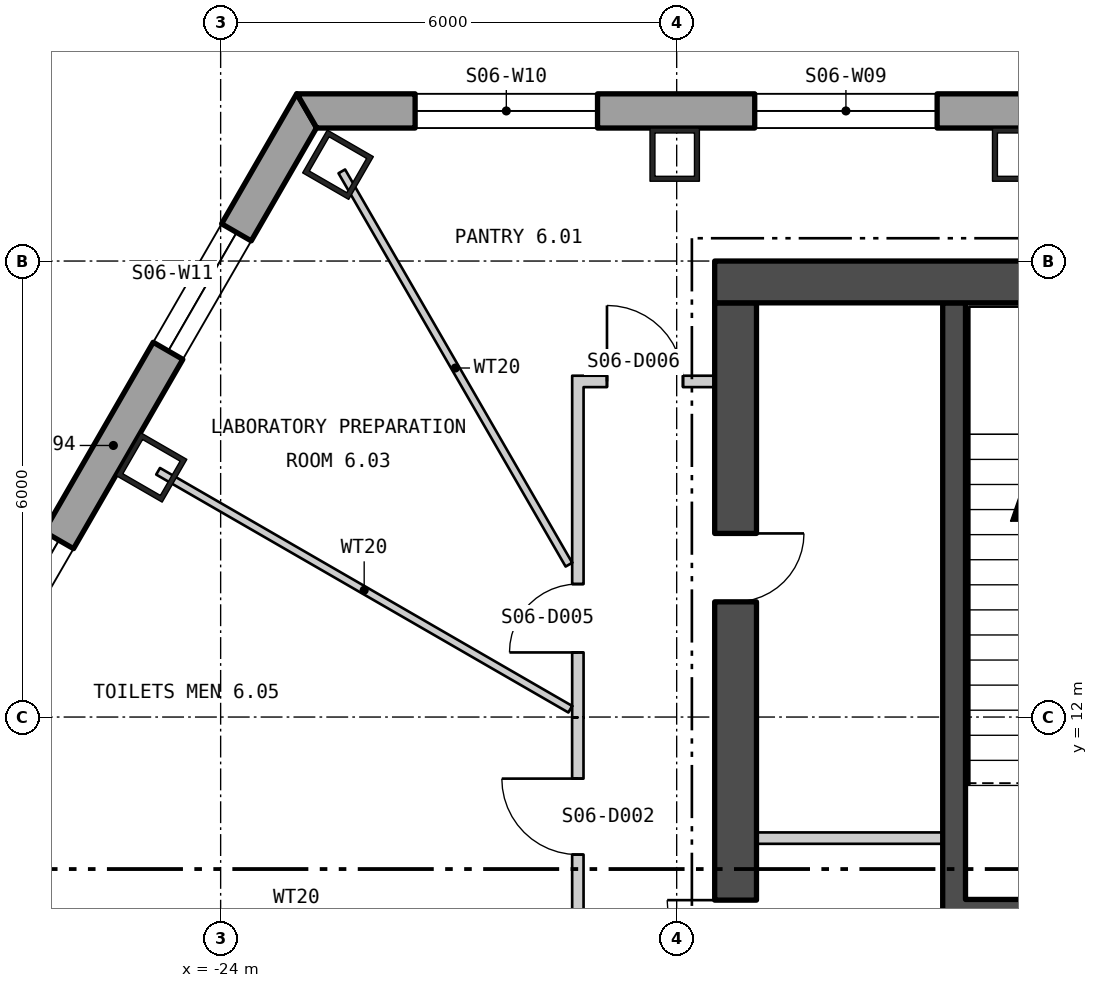
"""IFC4 building model, lengths in metres.
Left out: names, types, materials, properties, quantities, classifications, styles, units other than length and angle.
Written with IfcOpenShell. Run it as: python <this file> out.ifc"""

import sys

from ifc_helpers import new_model, si_unit, direction, frame, frame_2d, origin, origin_2d, place, context, subcontext, project, spatial, polyline, rectangle, hollow_rectangle, outline, extrude, element, fill, save


model = new_model("IFC4")
c1 = context("Model", 3, precision=1e-05, world=origin(), true_north=direction((0.0, 1.0)))
c2 = subcontext(c1, "Body", "Model", "MODEL_VIEW")
j1 = project(units=[si_unit("LENGTHUNIT", "METRE"), si_unit("PLANEANGLEUNIT", "RADIAN")], contexts=[c1])
p1 = place(None, origin())
s1 = spatial("IfcSite", under=j1, at=p1, CompositionType="ELEMENT")
p2 = place(p1, origin())
s2 = spatial("IfcBuilding", under=s1, at=p2, CompositionType="ELEMENT")
p3 = place(p2, frame((0.0, 0.0, 84.3)))
s3 = spatial("IfcBuildingStorey", under=s2, at=p3, CompositionType="ELEMENT", Elevation=84.3)
for number, where, z_axis, x_axis in (
    (1, (-13.52, 19.4, 0.0), (0.0, 0.0, 1.0), (-1.0, 0.0, 0.0)),
    (2, (-18.026, 19.4, 0.0), (0.0, 0.0, 1.0), (-1.0, 0.0, 0.0)),
    (3, (-22.456, 19.267, 0.0), (0.0, 0.0, 1.0), (-0.5, -0.866, 0.0)),
):
    element("IfcColumn", number, at=place(p3, frame(where, z_axis=z_axis, x_axis=x_axis)), inside=s3, PredefinedType="COLUMN", context=c2, shape_type="SweptSolid", body=[
        extrude(hollow_rectangle(XDim=0.65, YDim=0.7, WallThickness=0.065, at=origin_2d()), origin(), (0.0, 0.0, 1.0), 4.5),
    ])
p4 = place(p3, frame((-24.91, 15.284, -0.8), z_axis=(0.0, 0.0, 1.0), x_axis=(-0.5, -0.866025403784, 0.0)))
e4 = element("IfcColumn", 4, at=p4, inside=s3, PredefinedType="COLUMN", context=c2, shape_type="SweptSolid", body=[
    extrude(hollow_rectangle(XDim=0.65, YDim=0.7, WallThickness=0.065, at=origin_2d()), origin(), (0.0, 0.0, 1.0), 5.3),
])
p5 = place(p3, frame((22.865, 19.975, -0.4), z_axis=(0.0, 0.0, 1.0), x_axis=(-1.0, 0.0, 0.0)))
e5 = element("IfcWall", 5, at=p5, inside=s3, PredefinedType="SOLIDWALL", context=c2, shape_type="SweptSolid", body=[
    extrude(outline(polyline([(-0.13, -0.225), (45.86, -0.225), (45.6, 0.225), (0.13, 0.225), (-0.13, -0.225)])), origin(), (0.0, 0.0, 1.0), 4.5),
])
p6 = place(p5, frame((1.424, 0.0, 1.3)))
e6 = element("IfcOpeningElement", 6, at=p6, cuts=e5, PredefinedType="OPENING", context=c2, shape_type="SweptSolid", body=[
    extrude(rectangle(XDim=2.4, YDim=2.6, at=frame_2d((1.2, 1.3))), frame((0.0, 0.235, 0.0), z_axis=(0.0, -1.0, 0.0), x_axis=(1.0, 0.0, 0.0)), (0.0, 0.0, 1.0), 0.47),
])
p7 = place(p5, frame((5.892, 0.0, 1.3)))
e7 = element("IfcOpeningElement", 7, at=p7, cuts=e5, PredefinedType="OPENING", context=c2, shape_type="SweptSolid", body=[
    extrude(rectangle(XDim=2.4, YDim=2.6, at=frame_2d((1.2, 1.3))), frame((0.0, 0.235, 0.0), z_axis=(0.0, -1.0, 0.0), x_axis=(1.0, 0.0, 0.0)), (0.0, 0.0, 1.0), 0.47),
])
p8 = place(p5, frame((10.399, 0.0, 1.3)))
e8 = element("IfcOpeningElement", 8, at=p8, cuts=e5, PredefinedType="OPENING", context=c2, shape_type="SweptSolid", body=[
    extrude(rectangle(XDim=2.4, YDim=2.6, at=frame_2d((1.2, 1.3))), frame((0.0, 0.235, 0.0), z_axis=(0.0, -1.0, 0.0), x_axis=(1.0, 0.0, 0.0)), (0.0, 0.0, 1.0), 0.47),
])
p9 = place(p5, frame((14.905, 0.0, 1.3)))
e9 = element("IfcOpeningElement", 9, at=p9, cuts=e5, PredefinedType="OPENING", context=c2, shape_type="SweptSolid", body=[
    extrude(rectangle(XDim=2.4, YDim=2.6, at=frame_2d((1.2, 1.3))), frame((0.0, 0.235, 0.0), z_axis=(0.0, -1.0, 0.0), x_axis=(1.0, 0.0, 0.0)), (0.0, 0.0, 1.0), 0.47),
])
p10 = place(p5, frame((19.412, 0.0, 1.3)))
e10 = element("IfcOpeningElement", 10, at=p10, cuts=e5, PredefinedType="OPENING", context=c2, shape_type="SweptSolid", body=[
    extrude(rectangle(XDim=2.4, YDim=2.6, at=frame_2d((1.2, 1.3))), frame((0.0, 0.235, 0.0), z_axis=(0.0, -1.0, 0.0), x_axis=(1.0, 0.0, 0.0)), (0.0, 0.0, 1.0), 0.47),
])
p11 = place(p5, frame((23.918, 0.0, 1.3)))
e11 = element("IfcOpeningElement", 11, at=p11, cuts=e5, PredefinedType="OPENING", context=c2, shape_type="SweptSolid", body=[
    extrude(rectangle(XDim=2.4, YDim=2.6, at=frame_2d((1.2, 1.3))), frame((0.0, 0.235, 0.0), z_axis=(0.0, -1.0, 0.0), x_axis=(1.0, 0.0, 0.0)), (0.0, 0.0, 1.0), 0.47),
])
p12 = place(p5, frame((28.425, 0.0, 1.3)))
e12 = element("IfcOpeningElement", 12, at=p12, cuts=e5, PredefinedType="OPENING", context=c2, shape_type="SweptSolid", body=[
    extrude(rectangle(XDim=2.4, YDim=2.6, at=frame_2d((1.2, 1.3))), frame((0.0, 0.235, 0.0), z_axis=(0.0, -1.0, 0.0), x_axis=(1.0, 0.0, 0.0)), (0.0, 0.0, 1.0), 0.47),
])
p13 = place(p5, frame((32.932, 0.0, 1.3)))
e13 = element("IfcOpeningElement", 13, at=p13, cuts=e5, PredefinedType="OPENING", context=c2, shape_type="SweptSolid", body=[
    extrude(rectangle(XDim=2.4, YDim=2.6, at=frame_2d((1.2, 1.3))), frame((0.0, 0.235, 0.0), z_axis=(0.0, -1.0, 0.0), x_axis=(1.0, 0.0, 0.0)), (0.0, 0.0, 1.0), 0.47),
])
p14 = place(p5, frame((37.438, 0.0, 1.3)))
e14 = element("IfcOpeningElement", 14, at=p14, cuts=e5, PredefinedType="OPENING", context=c2, shape_type="SweptSolid", body=[
    extrude(rectangle(XDim=2.4, YDim=2.6, at=frame_2d((1.2, 1.3))), frame((0.0, 0.235, 0.0), z_axis=(0.0, -1.0, 0.0), x_axis=(1.0, 0.0, 0.0)), (0.0, 0.0, 1.0), 0.47),
])
p15 = place(p5, frame((41.907, 0.0, 1.3)))
e15 = element("IfcOpeningElement", 15, at=p15, cuts=e5, PredefinedType="OPENING", context=c2, shape_type="SweptSolid", body=[
    extrude(rectangle(XDim=2.4, YDim=2.6, at=frame_2d((1.2, 1.3))), frame((0.0, 0.235, 0.0), z_axis=(0.0, -1.0, 0.0), x_axis=(1.0, 0.0, 0.0)), (0.0, 0.0, 1.0), 0.47),
])
p16 = place(p3, frame((-22.869, 19.977, -0.4), z_axis=(0.0, 0.0, 1.0), x_axis=(-0.499997937663, -0.866026594472, 0.0)))
e16 = element("IfcWall", 16, at=p16, inside=s3, PredefinedType="SOLIDWALL", context=c2, shape_type="SweptSolid", body=[
    extrude(outline(polyline([(-0.13, -0.225), (10.3, -0.225), (10.04, 0.225), (0.13, 0.225), (-0.13, -0.225)])), origin(), (0.0, 0.0, 1.0), 4.5),
])
p17 = place(p16, frame((1.847, 0.0, 1.3)))
e17 = element("IfcOpeningElement", 17, at=p17, cuts=e16, PredefinedType="OPENING", context=c2, shape_type="SweptSolid", body=[
    extrude(rectangle(XDim=1.8, YDim=2.6, at=frame_2d((0.9, 1.3))), frame((0.0, 0.235, 0.0), z_axis=(0.0, -1.0, 0.0), x_axis=(1.0, 0.0, 0.0)), (0.0, 0.0, 1.0), 0.47),
])
p18 = place(p16, frame((6.523, 0.0, 1.3)))
e18 = element("IfcOpeningElement", 18, at=p18, cuts=e16, PredefinedType="OPENING", context=c2, shape_type="SweptSolid", body=[
    extrude(rectangle(XDim=1.8, YDim=2.6, at=frame_2d((0.9, 1.3))), frame((0.0, 0.235, 0.0), z_axis=(0.0, -1.0, 0.0), x_axis=(1.0, 0.0, 0.0)), (0.0, 0.0, 1.0), 0.47),
])
p19 = place(p3, frame((-27.95, 11.167, -0.18), z_axis=(0.0, 0.0, 1.0), x_axis=(0.499999194392, -0.866025868902, 0.0)))
e19 = element("IfcWall", 19, at=p19, inside=s3, PredefinedType="SOLIDWALL", context=c2, shape_type="SweptSolid", body=[
    extrude(outline(polyline([(-0.13, -0.225), (45.86, -0.225), (45.6, 0.225), (0.13, 0.225), (-0.13, -0.225)])), origin(), (0.0, 0.0, 1.0), 4.28),
])
p20 = place(p19, frame((5.892, 0.0, 1.08)))
e20 = element("IfcOpeningElement", 20, at=p20, cuts=e19, PredefinedType="OPENING", context=c2, shape_type="SweptSolid", body=[
    extrude(rectangle(XDim=2.4, YDim=2.6, at=frame_2d((1.2, 1.3))), frame((0.0, 0.235, 0.0), z_axis=(0.0, -1.0, 0.0), x_axis=(1.0, 0.0, 0.0)), (0.0, 0.0, 1.0), 0.47),
])
p21 = place(p19, frame((10.399, 0.0, 1.08)))
e21 = element("IfcOpeningElement", 21, at=p21, cuts=e19, PredefinedType="OPENING", context=c2, shape_type="SweptSolid", body=[
    extrude(rectangle(XDim=2.4, YDim=2.6, at=frame_2d((1.2, 1.3))), frame((0.0, 0.235, 0.0), z_axis=(0.0, -1.0, 0.0), x_axis=(1.0, 0.0, 0.0)), (0.0, 0.0, 1.0), 0.47),
])
p22 = place(p19, frame((14.905, 0.0, 1.08)))
e22 = element("IfcOpeningElement", 22, at=p22, cuts=e19, PredefinedType="OPENING", context=c2, shape_type="SweptSolid", body=[
    extrude(rectangle(XDim=2.4, YDim=2.6, at=frame_2d((1.2, 1.3))), frame((0.0, 0.235, 0.0), z_axis=(0.0, -1.0, 0.0), x_axis=(1.0, 0.0, 0.0)), (0.0, 0.0, 1.0), 0.47),
])
p23 = place(p19, frame((19.412, 0.0, 1.08)))
e23 = element("IfcOpeningElement", 23, at=p23, cuts=e19, PredefinedType="OPENING", context=c2, shape_type="SweptSolid", body=[
    extrude(rectangle(XDim=2.4, YDim=2.6, at=frame_2d((1.2, 1.3))), frame((0.0, 0.235, 0.0), z_axis=(0.0, -1.0, 0.0), x_axis=(1.0, 0.0, 0.0)), (0.0, 0.0, 1.0), 0.47),
])
p24 = place(p19, frame((23.918, 0.0, 1.08)))
e24 = element("IfcOpeningElement", 24, at=p24, cuts=e19, PredefinedType="OPENING", context=c2, shape_type="SweptSolid", body=[
    extrude(rectangle(XDim=2.4, YDim=2.6, at=frame_2d((1.2, 1.3))), frame((0.0, 0.235, 0.0), z_axis=(0.0, -1.0, 0.0), x_axis=(1.0, 0.0, 0.0)), (0.0, 0.0, 1.0), 0.47),
])
p25 = place(p19, frame((28.425, 0.0, 1.08)))
e25 = element("IfcOpeningElement", 25, at=p25, cuts=e19, PredefinedType="OPENING", context=c2, shape_type="SweptSolid", body=[
    extrude(rectangle(XDim=2.4, YDim=2.6, at=frame_2d((1.2, 1.3))), frame((0.0, 0.235, 0.0), z_axis=(0.0, -1.0, 0.0), x_axis=(1.0, 0.0, 0.0)), (0.0, 0.0, 1.0), 0.47),
])
p26 = place(p19, frame((32.932, 0.0, 1.08)))
e26 = element("IfcOpeningElement", 26, at=p26, cuts=e19, PredefinedType="OPENING", context=c2, shape_type="SweptSolid", body=[
    extrude(rectangle(XDim=2.4, YDim=2.6, at=frame_2d((1.2, 1.3))), frame((0.0, 0.235, 0.0), z_axis=(0.0, -1.0, 0.0), x_axis=(1.0, 0.0, 0.0)), (0.0, 0.0, 1.0), 0.47),
])
p27 = place(p19, frame((37.438, 0.0, 1.08)))
e27 = element("IfcOpeningElement", 27, at=p27, cuts=e19, PredefinedType="OPENING", context=c2, shape_type="SweptSolid", body=[
    extrude(rectangle(XDim=2.4, YDim=2.6, at=frame_2d((1.2, 1.3))), frame((0.0, 0.235, 0.0), z_axis=(0.0, -1.0, 0.0), x_axis=(1.0, 0.0, 0.0)), (0.0, 0.0, 1.0), 0.47),
])
p28 = place(p19, frame((41.907, 0.0, 1.08)))
e28 = element("IfcOpeningElement", 28, at=p28, cuts=e19, PredefinedType="OPENING", context=c2, shape_type="SweptSolid", body=[
    extrude(rectangle(XDim=2.4, YDim=2.6, at=frame_2d((1.2, 1.3))), frame((0.0, 0.235, 0.0), z_axis=(0.0, -1.0, 0.0), x_axis=(1.0, 0.0, 0.0)), (0.0, 0.0, 1.0), 0.47),
])
p29 = place(p3, frame((-17.5, 17.725, 0.0), z_axis=(0.0, 0.0, 1.0), x_axis=(1.0, 0.0, 0.0)))
e29 = element("IfcWall", 29, at=p29, inside=s3, PredefinedType="SHEAR", context=c2, shape_type="SweptSolid", body=[
    extrude(rectangle(XDim=35.0, YDim=0.55, at=frame_2d((17.5, 0.0))), origin(), (0.0, 0.0, 1.0), 4.3),
])
p30 = place(p3, frame((-17.225, 0.55, 0.0), z_axis=(0.0, 0.0, 1.0), x_axis=(0.0, 1.0, 0.0)))
e30 = element("IfcWall", 30, at=p30, inside=s3, PredefinedType="SHEAR", context=c2, shape_type="SweptSolid", body=[
    extrude(rectangle(XDim=16.9, YDim=0.55, at=frame_2d((8.45, 0.0))), origin(), (0.0, 0.0, 1.0), 4.3),
])
p31 = place(p30, frame((5.75, 0.0, 0.0)))
e31 = element("IfcOpeningElement", 31, at=p31, cuts=e30, PredefinedType="OPENING", context=c2, shape_type="SweptSolid", body=[
    extrude(rectangle(XDim=1.5, YDim=2.1, at=frame_2d((0.75, 1.05))), frame((0.0, 0.285, 0.0), z_axis=(0.0, -1.0, 0.0), x_axis=(1.0, 0.0, 0.0)), (0.0, 0.0, 1.0), 0.57),
])
p32 = place(p30, frame((0.4, 0.0, 0.0)))
e32 = element("IfcOpeningElement", 32, at=p32, cuts=e30, PredefinedType="OPENING", context=c2, shape_type="SweptSolid", body=[
    extrude(rectangle(XDim=1.0, YDim=2.1, at=frame_2d((0.5, 1.05))), frame((0.0, 0.285, 0.0), z_axis=(0.0, -1.0, 0.0), x_axis=(1.0, 0.0, 0.0)), (0.0, 0.0, 1.0), 0.57),
])
p33 = place(p30, frame((3.21, 0.0, 0.0)))
e33 = element("IfcOpeningElement", 33, at=p33, cuts=e30, PredefinedType="OPENING", context=c2, shape_type="SweptSolid", body=[
    extrude(rectangle(XDim=0.9, YDim=2.1, at=frame_2d((0.45, 1.05))), frame((0.0, 0.285, 0.0), z_axis=(0.0, -1.0, 0.0), x_axis=(1.0, 0.0, 0.0)), (0.0, 0.0, 1.0), 0.57),
])
p34 = place(p30, frame((8.141, 0.0, 0.0)))
e34 = element("IfcOpeningElement", 34, at=p34, cuts=e30, PredefinedType="OPENING", context=c2, shape_type="SweptSolid", body=[
    extrude(rectangle(XDim=0.9, YDim=2.1, at=frame_2d((0.45, 1.05))), frame((0.0, 0.285, 0.0), z_axis=(0.0, -1.0, 0.0), x_axis=(1.0, 0.0, 0.0)), (0.0, 0.0, 1.0), 0.57),
])
p35 = place(p30, frame((12.966, 0.0, 0.0)))
e35 = element("IfcOpeningElement", 35, at=p35, cuts=e30, PredefinedType="OPENING", context=c2, shape_type="SweptSolid", body=[
    extrude(rectangle(XDim=0.9, YDim=2.1, at=frame_2d((0.45, 1.05))), frame((0.0, 0.285, 0.0), z_axis=(0.0, -1.0, 0.0), x_axis=(1.0, 0.0, 0.0)), (0.0, 0.0, 1.0), 0.57),
])
p36 = place(p3, frame((-14.35, 0.55, 0.0), z_axis=(0.0, 0.0, 1.0), x_axis=(0.0, 1.0, 0.0)))
e36 = element("IfcWall", 36, at=p36, inside=s3, PredefinedType="SHEAR", context=c2, shape_type="SweptSolid", body=[
    extrude(rectangle(XDim=16.9, YDim=0.3, at=frame_2d((8.45, 0.0))), origin(), (0.0, 0.0, 1.0), 4.3),
])
p37 = place(p36, frame((5.75, 0.0, 0.0)))
e37 = element("IfcOpeningElement", 37, at=p37, cuts=e36, PredefinedType="OPENING", context=c2, shape_type="SweptSolid", body=[
    extrude(rectangle(XDim=1.5, YDim=2.1, at=frame_2d((0.75, 1.05))), frame((0.0, 0.16, 0.0), z_axis=(0.0, -1.0, 0.0), x_axis=(1.0, 0.0, 0.0)), (0.0, 0.0, 1.0), 0.32),
])
p38 = place(p3, frame((-14.2, 9.45, 0.0), z_axis=(0.0, 0.0, 1.0), x_axis=(1.0, 0.0, 0.0)))
e38 = element("IfcWall", 38, at=p38, inside=s3, PredefinedType="SHEAR", context=c2, shape_type="SweptSolid", body=[
    extrude(rectangle(XDim=3.2, YDim=0.3, at=frame_2d((1.6, 0.0))), origin(), (0.0, 0.0, 1.0), 4.3),
])
p39 = place(p38, frame((1.0, 0.0, 0.0)))
e39 = element("IfcOpeningElement", 39, at=p39, cuts=e38, PredefinedType="OPENING", context=c2, shape_type="SweptSolid", body=[
    extrude(rectangle(XDim=1.2, YDim=2.1, at=frame_2d((0.6, 1.05))), frame((0.0, 0.16, 0.0), z_axis=(0.0, -1.0, 0.0), x_axis=(1.0, 0.0, 0.0)), (0.0, 0.0, 1.0), 0.32),
])
p40 = place(p3, frame((-16.95, 10.407, 0.0), z_axis=(0.0, 0.0, 1.0), x_axis=(1.0, 0.0, 0.0)))
e40 = element("IfcWall", 40, at=p40, inside=s3, PredefinedType="PARTITIONING", context=c2, shape_type="SweptSolid", body=[
    extrude(rectangle(XDim=2.45, YDim=0.15, at=frame_2d((1.225, 0.0))), origin(), (0.0, 0.0, 1.0), 4.3),
])
p41 = place(p3, frame((-24.823, 15.234, 0.0), z_axis=(0.0, 0.0, 1.0), x_axis=(0.866023364538, -0.500003532061, 0.0)))
e41 = element("IfcWall", 41, at=p41, inside=s3, PredefinedType="PARTITIONING", context=c2, shape_type="SweptSolid", body=[
    extrude(rectangle(XDim=6.262, YDim=0.1, at=frame_2d((3.131, 0.0))), origin(), (0.0, 0.0, 1.0), 4.3),
])
p42 = place(p3, frame((-22.406, 19.18, 0.0), z_axis=(0.0, 0.0, 1.0), x_axis=(0.500026652407, -0.866010015463, 0.0)))
e42 = element("IfcWall", 42, at=p42, inside=s3, PredefinedType="PARTITIONING", context=c2, shape_type="SweptSolid", body=[
    extrude(rectangle(XDim=5.976, YDim=0.1, at=frame_2d((2.988, 0.0))), origin(), (0.0, 0.0, 1.0), 4.3),
])
p43 = place(p3, frame((-19.301, 11.995, 0.0), z_axis=(0.0, 0.0, 1.0), x_axis=(0.000383141734, -0.999999926601, 0.0)))
e43 = element("IfcWall", 43, at=p43, inside=s3, PredefinedType="PARTITIONING", context=c2, shape_type="SweptSolid", body=[
    extrude(rectangle(XDim=2.61, YDim=0.15, at=frame_2d((1.305, 0.0))), origin(), (0.0, 0.0, 1.0), 4.3),
])
p44 = place(p43, frame((0.805, 0.0, 0.0)))
e44 = element("IfcOpeningElement", 44, at=p44, cuts=e43, PredefinedType="OPENING", context=c2, shape_type="SweptSolid", body=[
    extrude(rectangle(XDim=1.0, YDim=2.1, at=frame_2d((0.5, 1.05))), frame((0.0, 0.085, 0.0), z_axis=(0.0, -1.0, 0.0), x_axis=(1.0, 0.0, 0.0)), (0.0, 0.0, 1.0), 0.17),
])
p45 = place(p3, frame((-19.3, 11.995, 0.0), z_axis=(0.0, 0.0, 1.0), x_axis=(0.0, 1.0, 0.0)))
e45 = element("IfcWall", 45, at=p45, inside=s3, PredefinedType="PARTITIONING", context=c2, shape_type="SweptSolid", body=[
    extrude(rectangle(XDim=4.496, YDim=0.15, at=frame_2d((2.248, 0.0))), origin(), (0.0, 0.0, 1.0), 4.3),
])
p46 = place(p45, frame((0.855, 0.0, 0.0)))
e46 = element("IfcOpeningElement", 46, at=p46, cuts=e45, PredefinedType="OPENING", context=c2, shape_type="SweptSolid", body=[
    extrude(rectangle(XDim=0.9, YDim=2.1, at=frame_2d((0.45, 1.05))), frame((0.0, 0.085, 0.0), z_axis=(0.0, -1.0, 0.0), x_axis=(1.0, 0.0, 0.0)), (0.0, 0.0, 1.0), 0.17),
])
p47 = place(p3, frame((-19.225, 16.416, 0.0), z_axis=(0.0, 0.0, 1.0), x_axis=(1.0, 0.0, 0.0)))
e47 = element("IfcWall", 47, at=p47, inside=s3, PredefinedType="PARTITIONING", context=c2, shape_type="SweptSolid", body=[
    extrude(rectangle(XDim=1.725, YDim=0.15, at=frame_2d((0.863, 0.0))), origin(), (0.0, 0.0, 1.0), 4.3),
])
p48 = place(p47, frame((0.308, 0.0, 0.0)))
e48 = element("IfcOpeningElement", 48, at=p48, cuts=e47, PredefinedType="OPENING", context=c2, shape_type="SweptSolid", body=[
    extrude(rectangle(XDim=1.0, YDim=2.1, at=frame_2d((0.5, 1.05))), frame((0.0, 0.085, 0.0), z_axis=(0.0, -1.0, 0.0), x_axis=(1.0, 0.0, 0.0)), (0.0, 0.0, 1.0), 0.17),
])
p49 = place(p14, origin())
e49 = element("IfcWindow", 49, at=p49, inside=s3, PartitioningType="SINGLE_PANEL", PredefinedType="WINDOW", context=c2, shape_type="SweptSolid", body=[
    extrude(rectangle(XDim=2.4, YDim=2.6, at=frame_2d((1.2, 1.3))), frame((0.0, 0.105, 0.0), z_axis=(0.0, -1.0, 0.0), x_axis=(1.0, 0.0, 0.0)), (0.0, 0.0, 1.0), 0.06),
])
fill(e14, e49)
p50 = place(p15, origin())
e50 = element("IfcWindow", 50, at=p50, inside=s3, PartitioningType="SINGLE_PANEL", PredefinedType="WINDOW", context=c2, shape_type="SweptSolid", body=[
    extrude(rectangle(XDim=2.4, YDim=2.6, at=frame_2d((1.2, 1.3))), frame((0.0, 0.105, 0.0), z_axis=(0.0, -1.0, 0.0), x_axis=(1.0, 0.0, 0.0)), (0.0, 0.0, 1.0), 0.06),
])
fill(e15, e50)
p51 = place(p17, origin())
e51 = element("IfcWindow", 51, at=p51, inside=s3, PartitioningType="SINGLE_PANEL", PredefinedType="WINDOW", context=c2, shape_type="SweptSolid", body=[
    extrude(rectangle(XDim=1.8, YDim=2.6, at=frame_2d((0.9, 1.3))), frame((0.0, 0.105, 0.0), z_axis=(0.0, -1.0, 0.0), x_axis=(1.0, 0.0, 0.0)), (0.0, 0.0, 1.0), 0.06),
])
fill(e17, e51)
p52 = place(p18, origin())
e52 = element("IfcWindow", 52, at=p52, inside=s3, PartitioningType="SINGLE_PANEL", PredefinedType="WINDOW", context=c2, shape_type="SweptSolid", body=[
    extrude(rectangle(XDim=1.8, YDim=2.6, at=frame_2d((0.9, 1.3))), frame((0.0, 0.105, 0.0), z_axis=(0.0, -1.0, 0.0), x_axis=(1.0, 0.0, 0.0)), (0.0, 0.0, 1.0), 0.06),
])
fill(e18, e52)
p53 = place(p34, origin())
e53 = element("IfcDoor", 53, at=p53, inside=s3, OperationType="SINGLE_SWING_LEFT", PredefinedType="DOOR", context=c2, shape_type="SweptSolid", body=[
    extrude(rectangle(XDim=0.9, YDim=2.1, at=frame_2d((0.45, 1.05))), frame((0.0, 0.025, 0.0), z_axis=(0.0, -1.0, 0.0), x_axis=(1.0, 0.0, 0.0)), (0.0, 0.0, 1.0), 0.05),
])
fill(e34, e53)
p54 = place(p35, origin())
e54 = element("IfcDoor", 54, at=p54, inside=s3, OperationType="SINGLE_SWING_RIGHT", PredefinedType="DOOR", context=c2, shape_type="SweptSolid", body=[
    extrude(rectangle(XDim=0.9, YDim=2.1, at=frame_2d((0.45, 1.05))), frame((0.0, 0.025, 0.0), z_axis=(0.0, -1.0, 0.0), x_axis=(1.0, 0.0, 0.0)), (0.0, 0.0, 1.0), 0.05),
])
fill(e35, e54)
p55 = place(p44, origin())
e55 = element("IfcDoor", 55, at=p55, inside=s3, OperationType="SINGLE_SWING_LEFT", PredefinedType="DOOR", context=c2, shape_type="SweptSolid", body=[
    extrude(rectangle(XDim=1.0, YDim=2.1, at=frame_2d((0.5, 1.05))), frame((0.0, 0.025, 0.0), z_axis=(0.0, -1.0, 0.0), x_axis=(1.0, 0.0, 0.0)), (0.0, 0.0, 1.0), 0.05),
])
fill(e44, e55)
p56 = place(p46, origin())
e56 = element("IfcDoor", 56, at=p56, inside=s3, OperationType="SINGLE_SWING_RIGHT", PredefinedType="DOOR", context=c2, shape_type="SweptSolid", body=[
    extrude(rectangle(XDim=0.9, YDim=2.1, at=frame_2d((0.45, 1.05))), frame((0.0, 0.025, 0.0), z_axis=(0.0, -1.0, 0.0), x_axis=(1.0, 0.0, 0.0)), (0.0, 0.0, 1.0), 0.05),
])
fill(e46, e56)
p57 = place(p48, origin())
e57 = element("IfcDoor", 57, at=p57, inside=s3, OperationType="SINGLE_SWING_RIGHT", PredefinedType="DOOR", context=c2, shape_type="SweptSolid", body=[
    extrude(rectangle(XDim=1.0, YDim=2.1, at=frame_2d((0.5, 1.05))), frame((0.0, 0.025, 0.0), z_axis=(0.0, -1.0, 0.0), x_axis=(1.0, 0.0, 0.0)), (0.0, 0.0, 1.0), 0.05),
])
fill(e48, e57)
save(model, sys.argv[1])
